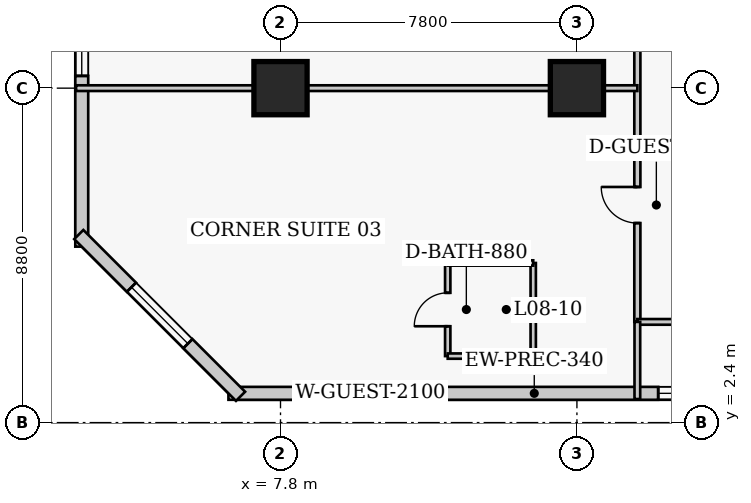
"""IFC4 building model, lengths in metres.
Left out: names, types, materials, properties, quantities, classifications, styles, units other than length and angle.
Written with IfcOpenShell. Run it as: python <this file> out.ifc"""

import sys

from ifc_helpers import new_model, si_unit, direction, frame, frame_2d, origin, origin_2d, place, context, subcontext, project, spatial, rectangle, extrude, element, fill, save


model = new_model("IFC4")
c1 = context("Model", 3, precision=1e-05, world=origin(), true_north=direction((0.0, 1.0)))
c2 = subcontext(c1, "Body", "Model", "MODEL_VIEW")
j1 = project(units=[si_unit("LENGTHUNIT", "METRE"), si_unit("PLANEANGLEUNIT", "RADIAN")], contexts=[c1])
p1 = place(None, origin())
s1 = spatial("IfcSite", under=j1, at=p1, CompositionType="ELEMENT")
p2 = place(p1, origin())
s2 = spatial("IfcBuilding", under=s1, at=p2, CompositionType="ELEMENT")
p3 = place(p2, frame((0.0, 0.0, 37.4)))
s3 = spatial("IfcBuildingStorey", under=s2, at=p3, CompositionType="ELEMENT", Elevation=37.4)
for number, where, z_axis, x_axis in (
    (1, (7.8, 11.2, 0.0), (0.0, 0.0, 1.0), (1.0, 0.0, 0.0)),
    (2, (15.6, 11.2, 0.0), (0.0, 0.0, 1.0), (1.0, 0.0, 0.0)),
):
    element("IfcColumn", number, at=place(p3, frame(where, z_axis=z_axis, x_axis=x_axis)), inside=s3, PredefinedType="COLUMN", context=c2, shape_type="SweptSolid", body=[
        extrude(rectangle(XDim=1.4, YDim=1.4, at=origin_2d()), origin(), (0.0, 0.0, 1.0), 3.8),
    ])
p4 = place(p3, frame((6.43, 3.17, 0.0), z_axis=(0.0, 0.0, 1.0), x_axis=(1.0, 0.0, 0.0)))
e3 = element("IfcWall", 3, at=p4, inside=s3, PredefinedType="SOLIDWALL", context=c2, shape_type="SweptSolid", body=[
    extrude(rectangle(XDim=29.89, YDim=0.34, at=frame_2d((14.945, 0.0))), origin(), (0.0, 0.0, 1.0), 3.54),
])
p5 = place(p4, frame((20.92, 0.0, 0.0)))
e4 = element("IfcOpeningElement", 4, at=p5, cuts=e3, PredefinedType="OPENING", context=c2, shape_type="SweptSolid", body=[
    extrude(rectangle(XDim=1.4, YDim=2.15, at=frame_2d((0.7, 1.075))), frame((0.0, 0.18, 0.0), z_axis=(0.0, -1.0, 0.0), x_axis=(1.0, 0.0, 0.0)), (0.0, 0.0, 1.0), 0.36),
])
p6 = place(p4, frame((2.686, 0.0, 0.85)))
e5 = element("IfcOpeningElement", 5, at=p6, cuts=e3, PredefinedType="OPENING", context=c2, shape_type="SweptSolid", body=[
    extrude(rectangle(XDim=2.1, YDim=1.85, at=frame_2d((1.05, 0.925))), frame((0.0, 0.18, 0.0), z_axis=(0.0, -1.0, 0.0), x_axis=(1.0, 0.0, 0.0)), (0.0, 0.0, 1.0), 0.36),
])
p7 = place(p4, frame((11.309, 0.0, 0.85)))
e6 = element("IfcOpeningElement", 6, at=p7, cuts=e3, PredefinedType="OPENING", context=c2, shape_type="SweptSolid", body=[
    extrude(rectangle(XDim=2.1, YDim=1.85, at=frame_2d((1.05, 0.925))), frame((0.0, 0.18, 0.0), z_axis=(0.0, -1.0, 0.0), x_axis=(1.0, 0.0, 0.0)), (0.0, 0.0, 1.0), 0.36),
])
p8 = place(p4, frame((17.631, 0.0, 0.85)))
e7 = element("IfcOpeningElement", 7, at=p8, cuts=e3, PredefinedType="OPENING", context=c2, shape_type="SweptSolid", body=[
    extrude(rectangle(XDim=2.1, YDim=1.85, at=frame_2d((1.05, 0.925))), frame((0.0, 0.18, 0.0), z_axis=(0.0, -1.0, 0.0), x_axis=(1.0, 0.0, 0.0)), (0.0, 0.0, 1.0), 0.36),
])
p9 = place(p4, frame((25.104, 0.0, 0.85)))
e8 = element("IfcOpeningElement", 8, at=p9, cuts=e3, PredefinedType="OPENING", context=c2, shape_type="SweptSolid", body=[
    extrude(rectangle(XDim=2.1, YDim=1.85, at=frame_2d((1.05, 0.925))), frame((0.0, 0.18, 0.0), z_axis=(0.0, -1.0, 0.0), x_axis=(1.0, 0.0, 0.0)), (0.0, 0.0, 1.0), 0.36),
])
p10 = place(p3, frame((2.57, 42.17, 0.0), z_axis=(0.0, 0.0, 1.0), x_axis=(0.0, -1.0, 0.0)))
e9 = element("IfcWall", 9, at=p10, inside=s3, PredefinedType="SOLIDWALL", context=c2, shape_type="SweptSolid", body=[
    extrude(rectangle(XDim=35.14, YDim=0.34, at=frame_2d((17.57, 0.0))), origin(), (0.0, 0.0, 1.0), 3.54),
])
p11 = place(p10, frame((3.343, 0.0, 0.85)))
e10 = element("IfcOpeningElement", 10, at=p11, cuts=e9, PredefinedType="OPENING", context=c2, shape_type="SweptSolid", body=[
    extrude(rectangle(XDim=2.1, YDim=1.85, at=frame_2d((1.05, 0.925))), frame((0.0, 0.18, 0.0), z_axis=(0.0, -1.0, 0.0), x_axis=(1.0, 0.0, 0.0)), (0.0, 0.0, 1.0), 0.36),
])
p12 = place(p10, frame((10.978, 0.0, 0.85)))
e11 = element("IfcOpeningElement", 11, at=p12, cuts=e9, PredefinedType="OPENING", context=c2, shape_type="SweptSolid", body=[
    extrude(rectangle(XDim=2.1, YDim=1.85, at=frame_2d((1.05, 0.925))), frame((0.0, 0.18, 0.0), z_axis=(0.0, -1.0, 0.0), x_axis=(1.0, 0.0, 0.0)), (0.0, 0.0, 1.0), 0.36),
])
p13 = place(p10, frame((19.762, 0.0, 0.85)))
e12 = element("IfcOpeningElement", 12, at=p13, cuts=e9, PredefinedType="OPENING", context=c2, shape_type="SweptSolid", body=[
    extrude(rectangle(XDim=2.1, YDim=1.85, at=frame_2d((1.05, 0.925))), frame((0.0, 0.18, 0.0), z_axis=(0.0, -1.0, 0.0), x_axis=(1.0, 0.0, 0.0)), (0.0, 0.0, 1.0), 0.36),
])
p14 = place(p10, frame((28.548, 0.0, 0.85)))
e13 = element("IfcOpeningElement", 13, at=p14, cuts=e9, PredefinedType="OPENING", context=c2, shape_type="SweptSolid", body=[
    extrude(rectangle(XDim=2.1, YDim=1.85, at=frame_2d((1.05, 0.925))), frame((0.0, 0.18, 0.0), z_axis=(0.0, -1.0, 0.0), x_axis=(1.0, 0.0, 0.0)), (0.0, 0.0, 1.0), 0.36),
])
p15 = place(p3, frame((2.492, 7.348, 0.0), z_axis=(0.0, 0.0, 1.0), x_axis=(0.707106781187, -0.707106781187, 0.0)))
e14 = element("IfcWall", 14, at=p15, inside=s3, PredefinedType="SOLIDWALL", context=c2, shape_type="SweptSolid", body=[
    extrude(rectangle(XDim=6.02, YDim=0.34, at=frame_2d((3.01, 0.0))), origin(), (0.0, 0.0, 1.0), 3.54),
])
p16 = place(p15, frame((1.96, 0.0, 0.85)))
e15 = element("IfcOpeningElement", 15, at=p16, cuts=e14, PredefinedType="OPENING", context=c2, shape_type="SweptSolid", body=[
    extrude(rectangle(XDim=2.1, YDim=1.85, at=frame_2d((1.05, 0.925))), frame((0.0, 0.18, 0.0), z_axis=(0.0, -1.0, 0.0), x_axis=(1.0, 0.0, 0.0)), (0.0, 0.0, 1.0), 0.36),
])
p17 = place(p3, frame((17.19, 5.05, 0.0), z_axis=(0.0, 0.0, 1.0), x_axis=(0.0, 1.0, 0.0)))
e16 = element("IfcWall", 16, at=p17, inside=s3, PredefinedType="PARTITIONING", context=c2, shape_type="SweptSolid", body=[
    extrude(rectangle(XDim=35.6, YDim=0.16, at=frame_2d((17.8, 0.0))), origin(), (0.0, 0.0, 1.0), 3.54),
])
p18 = place(p17, frame((2.6, 0.0, 0.0)))
e17 = element("IfcOpeningElement", 17, at=p18, cuts=e16, PredefinedType="OPENING", context=c2, shape_type="SweptSolid", body=[
    extrude(rectangle(XDim=0.95, YDim=2.1, at=frame_2d((0.475, 1.05))), frame((0.0, 0.09, 0.0), z_axis=(0.0, -1.0, 0.0), x_axis=(1.0, 0.0, 0.0)), (0.0, 0.0, 1.0), 0.18),
])
p19 = place(p17, frame((10.075, 0.0, 0.0)))
e18 = element("IfcOpeningElement", 18, at=p19, cuts=e16, PredefinedType="OPENING", context=c2, shape_type="SweptSolid", body=[
    extrude(rectangle(XDim=0.95, YDim=2.1, at=frame_2d((0.475, 1.05))), frame((0.0, 0.09, 0.0), z_axis=(0.0, -1.0, 0.0), x_axis=(1.0, 0.0, 0.0)), (0.0, 0.0, 1.0), 0.18),
])
p20 = place(p17, frame((18.875, 0.0, 0.0)))
e19 = element("IfcOpeningElement", 19, at=p20, cuts=e16, PredefinedType="OPENING", context=c2, shape_type="SweptSolid", body=[
    extrude(rectangle(XDim=0.95, YDim=2.1, at=frame_2d((0.475, 1.05))), frame((0.0, 0.09, 0.0), z_axis=(0.0, -1.0, 0.0), x_axis=(1.0, 0.0, 0.0)), (0.0, 0.0, 1.0), 0.18),
])
p21 = place(p17, frame((26.925, 0.0, 0.0)))
e20 = element("IfcOpeningElement", 20, at=p21, cuts=e16, PredefinedType="OPENING", context=c2, shape_type="SweptSolid", body=[
    extrude(rectangle(XDim=0.95, YDim=2.1, at=frame_2d((0.475, 1.05))), frame((0.0, 0.09, 0.0), z_axis=(0.0, -1.0, 0.0), x_axis=(1.0, 0.0, 0.0)), (0.0, 0.0, 1.0), 0.18),
])
p22 = place(p17, frame((34.16, 0.0, 0.0)))
e21 = element("IfcOpeningElement", 21, at=p22, cuts=e16, PredefinedType="OPENING", context=c2, shape_type="SweptSolid", body=[
    extrude(rectangle(XDim=1.0, YDim=2.15, at=frame_2d((0.5, 1.075))), frame((0.0, 0.09, 0.0), z_axis=(0.0, -1.0, 0.0), x_axis=(1.0, 0.0, 0.0)), (0.0, 0.0, 1.0), 0.18),
])
p23 = place(p3, frame((17.19, 5.05, 0.0), z_axis=(0.0, 0.0, 1.0), x_axis=(1.0, 0.0, 0.0)))
e22 = element("IfcWall", 22, at=p23, inside=s3, PredefinedType="PARTITIONING", context=c2, shape_type="SweptSolid", body=[
    extrude(rectangle(XDim=2.22, YDim=0.15, at=frame_2d((1.11, 0.0))), origin(), (0.0, 0.0, 1.0), 3.54),
])
p24 = place(p3, frame((17.19, 3.02, 0.0), z_axis=(0.0, 0.0, 1.0), x_axis=(0.0, 1.0, 0.0)))
e23 = element("IfcWall", 23, at=p24, inside=s3, PredefinedType="PARTITIONING", context=c2, shape_type="SweptSolid", body=[
    extrude(rectangle(XDim=2.03, YDim=0.15, at=frame_2d((1.015, 0.0))), origin(), (0.0, 0.0, 1.0), 3.54),
])
p25 = place(p3, frame((12.2, 4.15, 0.0), z_axis=(0.0, 0.0, 1.0), x_axis=(0.0, 1.0, 0.0)))
e24 = element("IfcWall", 24, at=p25, inside=s3, PredefinedType="PLUMBINGWALL", context=c2, shape_type="SweptSolid", body=[
    extrude(rectangle(XDim=2.45, YDim=0.14, at=frame_2d((1.225, 0.0))), origin(), (0.0, 0.0, 1.0), 3.54),
])
p26 = place(p25, frame((0.785, 0.0, 0.0)))
e25 = element("IfcOpeningElement", 25, at=p26, cuts=e24, PredefinedType="OPENING", context=c2, shape_type="SweptSolid", body=[
    extrude(rectangle(XDim=0.88, YDim=2.05, at=frame_2d((0.44, 1.025))), frame((0.0, 0.08, 0.0), z_axis=(0.0, -1.0, 0.0), x_axis=(1.0, 0.0, 0.0)), (0.0, 0.0, 1.0), 0.16),
])
p27 = place(p3, frame((14.45, 4.15, 0.0), z_axis=(0.0, 0.0, 1.0), x_axis=(0.0, 1.0, 0.0)))
e26 = element("IfcWall", 26, at=p27, inside=s3, PredefinedType="PLUMBINGWALL", context=c2, shape_type="SweptSolid", body=[
    extrude(rectangle(XDim=2.45, YDim=0.14, at=frame_2d((1.225, 0.0))), origin(), (0.0, 0.0, 1.0), 3.54),
])
for number, where, z_axis, x_axis in (
    (27, (12.2, 4.15, 0.0), (0.0, 0.0, 1.0), (1.0, 0.0, 0.0)),
    (28, (12.2, 6.6, 0.0), (0.0, 0.0, 1.0), (1.0, 0.0, 0.0)),
):
    element("IfcWall", number, at=place(p3, frame(where, z_axis=z_axis, x_axis=x_axis)), inside=s3, PredefinedType="PLUMBINGWALL", context=c2, shape_type="SweptSolid", body=[
        extrude(rectangle(XDim=2.25, YDim=0.14, at=frame_2d((1.125, 0.0))), origin(), (0.0, 0.0, 1.0), 3.54),
    ])
p28 = place(p3, frame((2.42, 11.2, 0.0), z_axis=(0.0, 0.0, 1.0), x_axis=(1.0, 0.0, 0.0)))
e29 = element("IfcWall", 29, at=p28, inside=s3, PredefinedType="PARTITIONING", context=c2, shape_type="SweptSolid", body=[
    extrude(rectangle(XDim=14.77, YDim=0.15, at=frame_2d((7.385, 0.0))), origin(), (0.0, 0.0, 1.0), 2.593),
])
p29 = place(p6, origin())
e30 = element("IfcWindow", 30, at=p29, inside=s3, PartitioningType="SINGLE_PANEL", PredefinedType="WINDOW", context=c2, shape_type="SweptSolid", body=[
    extrude(rectangle(XDim=2.1, YDim=1.85, at=frame_2d((1.05, 0.925))), frame((0.0, 0.03, 0.0), z_axis=(0.0, -1.0, 0.0), x_axis=(1.0, 0.0, 0.0)), (0.0, 0.0, 1.0), 0.06),
])
fill(e5, e30)
p30 = place(p7, origin())
e31 = element("IfcWindow", 31, at=p30, inside=s3, PartitioningType="SINGLE_PANEL", PredefinedType="WINDOW", context=c2, shape_type="SweptSolid", body=[
    extrude(rectangle(XDim=2.1, YDim=1.85, at=frame_2d((1.05, 0.925))), frame((0.0, 0.03, 0.0), z_axis=(0.0, -1.0, 0.0), x_axis=(1.0, 0.0, 0.0)), (0.0, 0.0, 1.0), 0.06),
])
fill(e6, e31)
p31 = place(p14, origin())
e32 = element("IfcWindow", 32, at=p31, inside=s3, PartitioningType="SINGLE_PANEL", PredefinedType="WINDOW", context=c2, shape_type="SweptSolid", body=[
    extrude(rectangle(XDim=2.1, YDim=1.85, at=frame_2d((1.05, 0.925))), frame((0.0, 0.03, 0.0), z_axis=(0.0, -1.0, 0.0), x_axis=(1.0, 0.0, 0.0)), (0.0, 0.0, 1.0), 0.06),
])
fill(e13, e32)
p32 = place(p16, origin())
e33 = element("IfcWindow", 33, at=p32, inside=s3, PartitioningType="SINGLE_PANEL", PredefinedType="WINDOW", context=c2, shape_type="SweptSolid", body=[
    extrude(rectangle(XDim=2.1, YDim=1.85, at=frame_2d((1.05, 0.925))), frame((0.0, 0.03, 0.0), z_axis=(0.0, -1.0, 0.0), x_axis=(1.0, 0.0, 0.0)), (0.0, 0.0, 1.0), 0.06),
])
fill(e15, e33)
p33 = place(p26, origin())
e34 = element("IfcDoor", 34, at=p33, inside=s3, OperationType="SINGLE_SWING_LEFT", PredefinedType="DOOR", context=c2, shape_type="SweptSolid", body=[
    extrude(rectangle(XDim=0.88, YDim=2.05, at=frame_2d((0.44, 1.025))), frame((0.0, 0.025, 0.0), z_axis=(0.0, -1.0, 0.0), x_axis=(1.0, 0.0, 0.0)), (0.0, 0.0, 1.0), 0.05),
])
fill(e25, e34)
p34 = place(p18, origin())
e35 = element("IfcDoor", 35, at=p34, inside=s3, OperationType="SINGLE_SWING_RIGHT", PredefinedType="DOOR", context=c2, shape_type="SweptSolid", body=[
    extrude(rectangle(XDim=0.95, YDim=2.1, at=frame_2d((0.475, 1.05))), frame((0.0, 0.025, 0.0), z_axis=(0.0, -1.0, 0.0), x_axis=(1.0, 0.0, 0.0)), (0.0, 0.0, 1.0), 0.05),
])
fill(e17, e35)
save(model, sys.argv[1])
